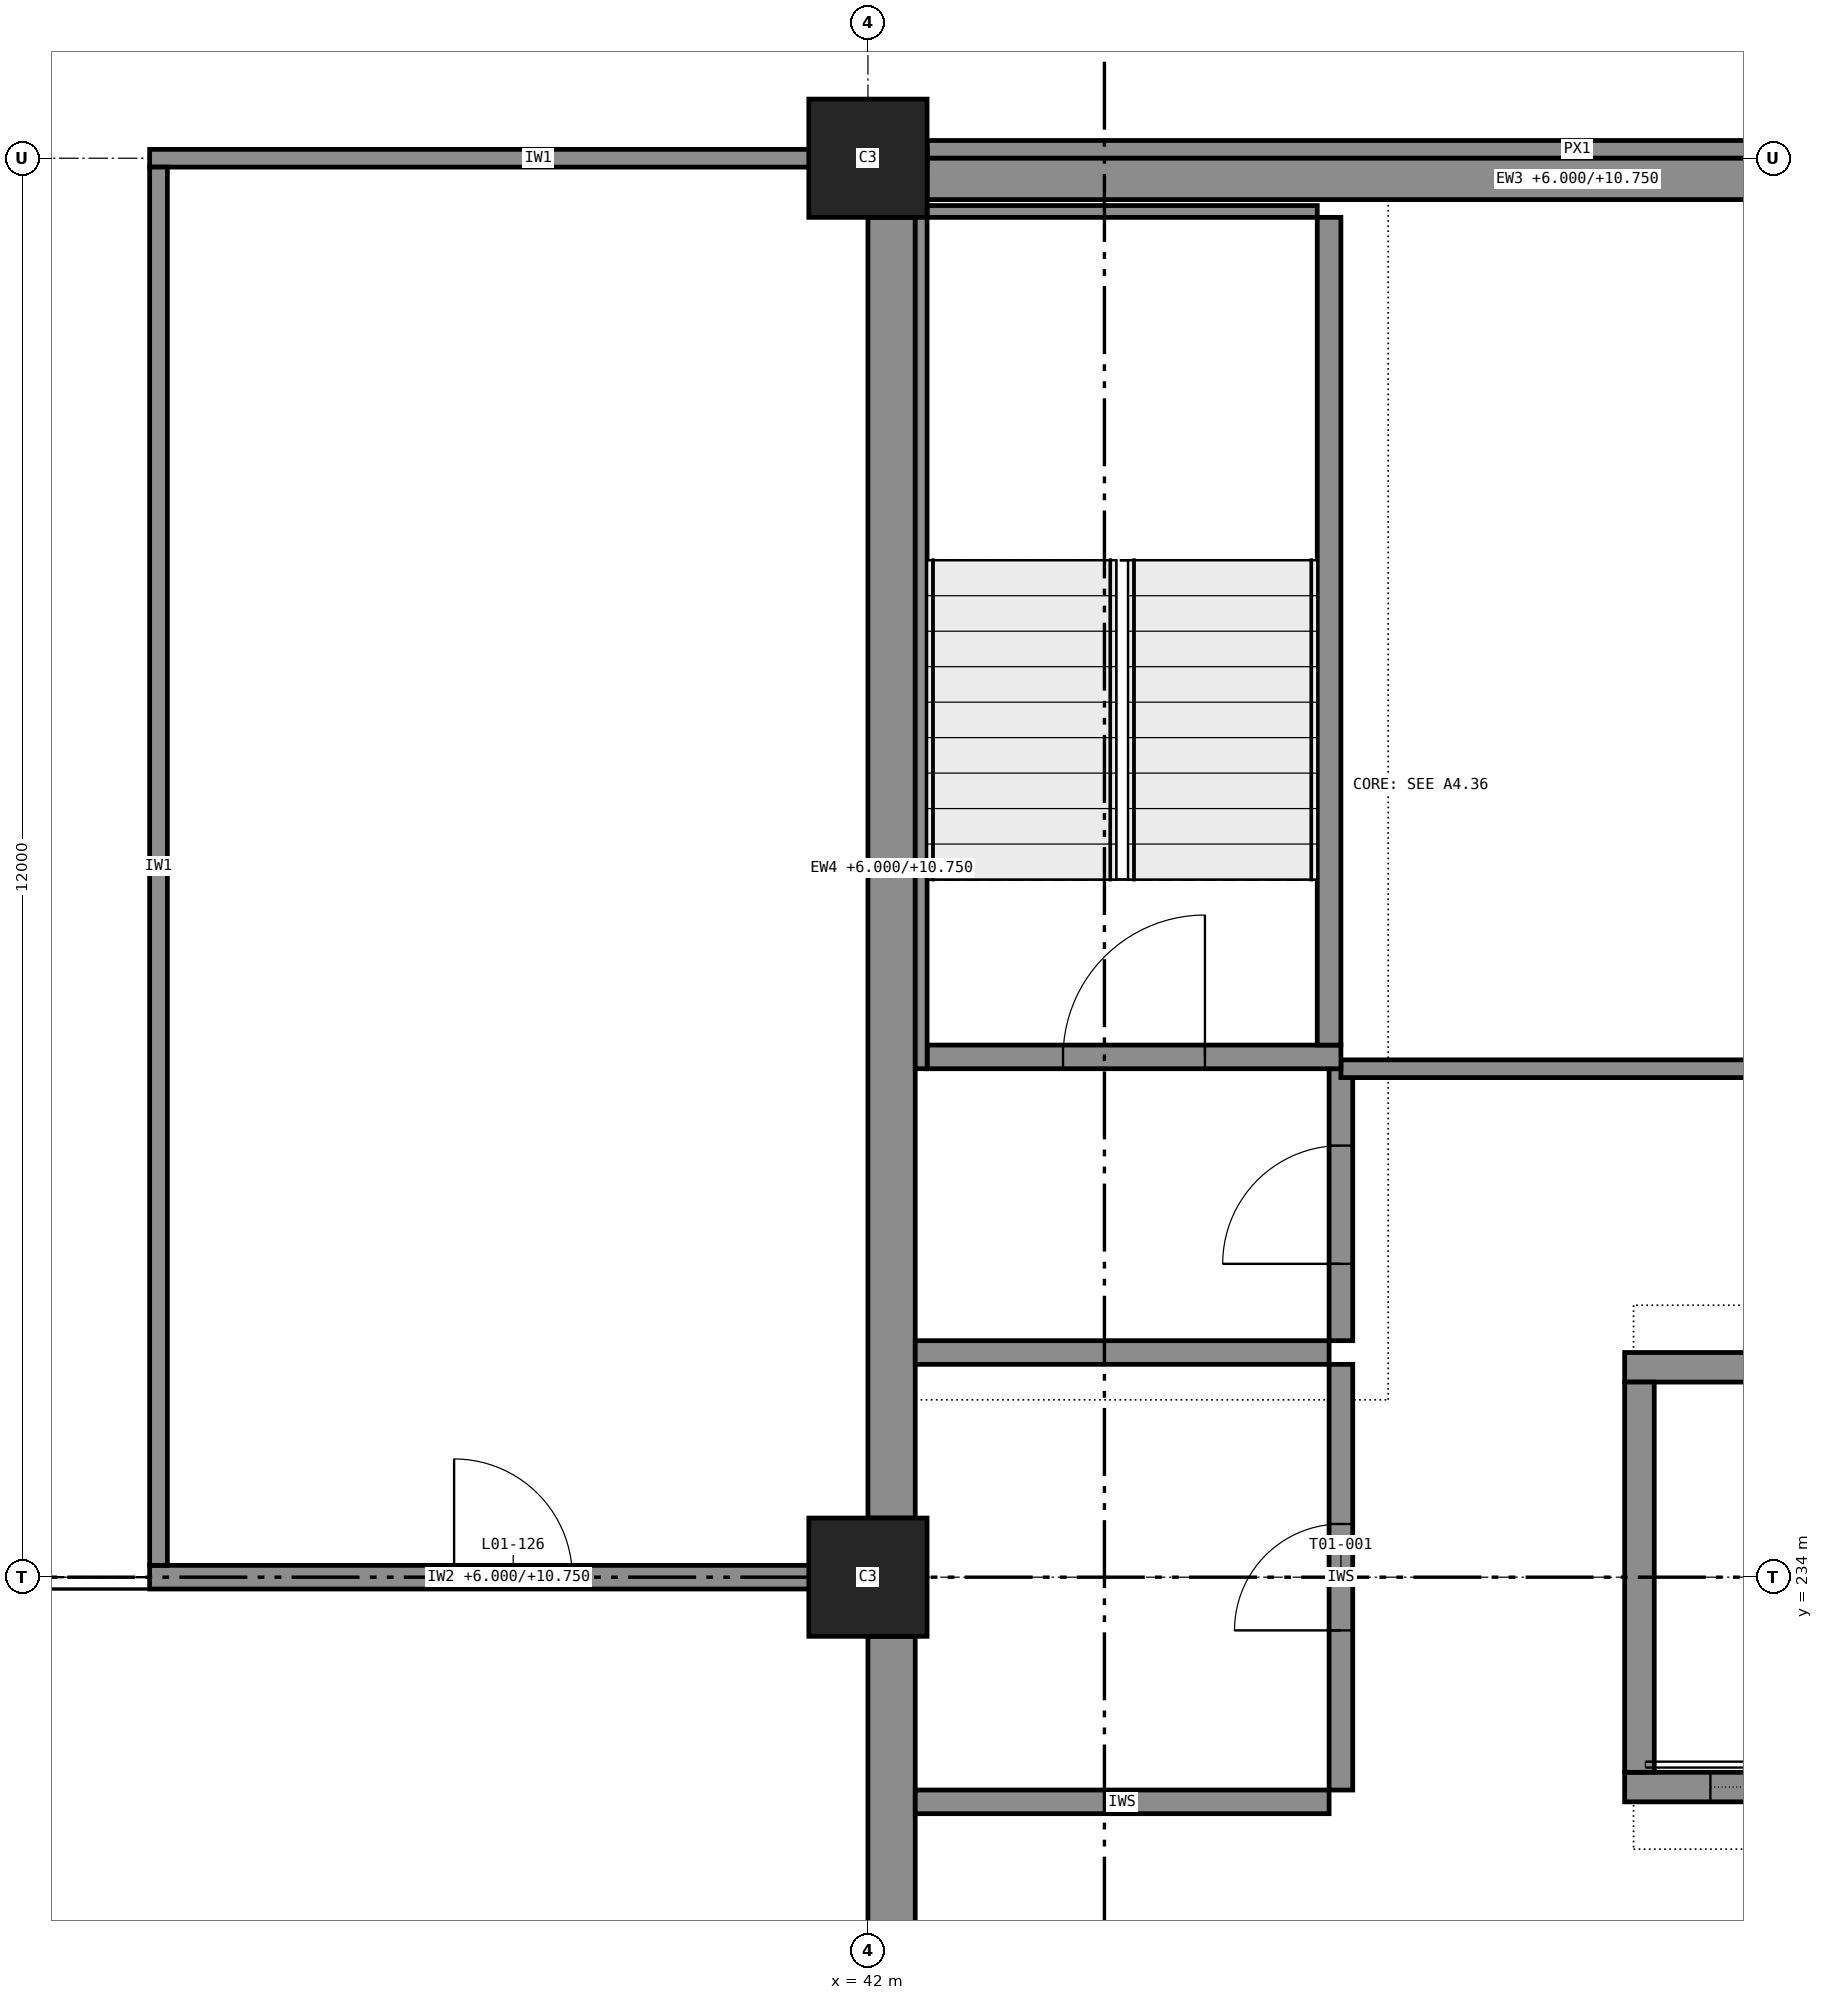
"""IFC4 building model, lengths in metres.
Left out: names, types, materials, properties, quantities, classifications, styles, units other than length and angle.
Written with IfcOpenShell. Run it as: python <this file> out.ifc"""

import sys

from ifc_helpers import new_model, si_unit, direction, frame, frame_2d, origin, origin_2d, place, context, subcontext, project, spatial, rectangle, extrude, element, fill, save


model = new_model("IFC4")
c1 = context("Model", 3, precision=1e-05, world=origin(), true_north=direction((0.0, 1.0)))
c2 = subcontext(c1, "Body", "Model", "MODEL_VIEW")
j1 = project(units=[si_unit("LENGTHUNIT", "METRE"), si_unit("PLANEANGLEUNIT", "RADIAN")], contexts=[c1])
p1 = place(None, origin())
s1 = spatial("IfcSite", under=j1, at=p1, CompositionType="ELEMENT")
p2 = place(p1, origin())
s2 = spatial("IfcBuilding", under=s1, at=p2, CompositionType="ELEMENT")
p3 = place(p2, frame((0.0, 0.0, 6.0)))
s3 = spatial("IfcBuildingStorey", under=s2, at=p3, CompositionType="ELEMENT", Elevation=6.0)
for number, where, z_axis, x_axis in (
    (1, (42.0, 234.0, 0.0), (0.0, 0.0, 1.0), (1.0, 0.0, 0.0)),
    (2, (42.0, 246.0, 0.0), (0.0, 0.0, 1.0), (1.0, 0.0, 0.0)),
):
    element("IfcColumn", number, at=place(p3, frame(where, z_axis=z_axis, x_axis=x_axis)), inside=s3, PredefinedType="COLUMN", context=c2, shape_type="SweptSolid", body=[
        extrude(rectangle(XDim=1.0, YDim=1.0, at=origin_2d()), origin(), (0.0, 0.0, 1.0), 6.0),
    ])
p4 = place(p3, frame((48.4, 232.225, 0.0), z_axis=(0.0, 0.0, 1.0), x_axis=(1.0, 0.0, 0.0)))
e3 = element("IfcWall", 3, at=p4, inside=s3, PredefinedType="SHEAR", context=c2, shape_type="SweptSolid", body=[
    extrude(rectangle(XDim=2.55, YDim=0.25, at=frame_2d((1.275, 0.0))), origin(), (0.0, 0.0, 1.0), 6.0),
])
p5 = place(p4, frame((0.725, 0.0, 0.0)))
e4 = element("IfcOpeningElement", 4, at=p5, cuts=e3, PredefinedType="OPENING", context=c2, shape_type="SweptSolid", body=[
    extrude(rectangle(XDim=1.1, YDim=2.1, at=frame_2d((0.55, 1.05))), frame((0.0, 0.135, 0.0), z_axis=(0.0, -1.0, 0.0), x_axis=(1.0, 0.0, 0.0)), (0.0, 0.0, 1.0), 0.27),
])
p6 = place(p3, frame((48.4, 235.775, 0.0), z_axis=(0.0, 0.0, 1.0), x_axis=(1.0, 0.0, 0.0)))
e5 = element("IfcWall", 5, at=p6, inside=s3, PredefinedType="SHEAR", context=c2, shape_type="SweptSolid", body=[
    extrude(rectangle(XDim=2.55, YDim=0.25, at=frame_2d((1.275, 0.0))), origin(), (0.0, 0.0, 1.0), 6.0),
])
p7 = place(p3, frame((48.525, 232.35, 0.0), z_axis=(0.0, 0.0, 1.0), x_axis=(0.0, 1.0, 0.0)))
e6 = element("IfcWall", 6, at=p7, inside=s3, PredefinedType="SHEAR", context=c2, shape_type="SweptSolid", body=[
    extrude(rectangle(XDim=3.3, YDim=0.25, at=frame_2d((1.65, 0.0))), origin(), (0.0, 0.0, 1.0), 6.0),
])
p8 = place(p3, frame((42.5, 238.4, 0.0), z_axis=(0.0, 0.0, 1.0), x_axis=(1.0, 0.0, 0.0)))
e7 = element("IfcWall", 7, at=p8, inside=s3, PredefinedType="SHEAR", context=c2, shape_type="SweptSolid", body=[
    extrude(rectangle(XDim=3.5, YDim=0.2, at=frame_2d((1.75, 0.0))), origin(), (0.0, 0.0, 1.0), 6.0),
])
p9 = place(p8, frame((1.15, 0.0, 0.0)))
e8 = element("IfcOpeningElement", 8, at=p9, cuts=e7, PredefinedType="OPENING", context=c2, shape_type="SweptSolid", body=[
    extrude(rectangle(XDim=1.2, YDim=2.1, at=frame_2d((0.6, 1.05))), frame((0.0, 0.11, 0.0), z_axis=(0.0, -1.0, 0.0), x_axis=(1.0, 0.0, 0.0)), (0.0, 0.0, 1.0), 0.22),
])
p10 = place(p3, frame((45.9, 238.5, 0.0), z_axis=(0.0, 0.0, 1.0), x_axis=(0.0, 1.0, 0.0)))
e9 = element("IfcWall", 9, at=p10, inside=s3, PredefinedType="SHEAR", context=c2, shape_type="SweptSolid", body=[
    extrude(rectangle(XDim=7.0, YDim=0.2, at=frame_2d((3.5, 0.0))), origin(), (0.0, 0.0, 1.0), 6.0),
])
p11 = place(p3, frame((42.45, 238.3, 0.0), z_axis=(0.0, 0.0, 1.0), x_axis=(0.0, 1.0, 0.0)))
e10 = element("IfcWall", 10, at=p11, inside=s3, PredefinedType="SHEAR", context=c2, shape_type="SweptSolid", body=[
    extrude(rectangle(XDim=7.3, YDim=0.1, at=frame_2d((3.65, 0.0))), origin(), (0.0, 0.0, 1.0), 5.75),
])
p12 = place(p3, frame((42.5, 245.55, 0.0), z_axis=(0.0, 0.0, 1.0), x_axis=(1.0, 0.0, 0.0)))
e11 = element("IfcWall", 11, at=p12, inside=s3, PredefinedType="SHEAR", context=c2, shape_type="SweptSolid", body=[
    extrude(rectangle(XDim=3.3, YDim=0.1, at=frame_2d((1.65, 0.0))), origin(), (0.0, 0.0, 1.0), 5.75),
])
p13 = place(p3, frame((53.5, 245.825, 0.0), z_axis=(0.0, 0.0, 1.0), x_axis=(-1.0, 0.0, 0.0)))
e12 = element("IfcWall", 12, at=p13, inside=s3, PredefinedType="STANDARD", context=c2, shape_type="SweptSolid", body=[
    extrude(rectangle(XDim=11.0, YDim=0.35, at=frame_2d((5.5, 0.0))), origin(), (0.0, 0.0, 1.0), 4.75),
])
p14 = place(p3, frame((53.5, 246.075, 5.75), z_axis=(0.0, 0.0, 1.0), x_axis=(-1.0, 0.0, 0.0)))
e13 = element("IfcWall", 13, at=p14, inside=s3, PredefinedType="STANDARD", context=c2, shape_type="SweptSolid", body=[
    extrude(rectangle(XDim=11.0, YDim=0.15, at=frame_2d((5.5, 0.0))), origin(), (0.0, 0.0, 1.0), 0.25),
])
for number, where, z_axis, x_axis in (
    (14, (42.2, 245.5, 0.0), (0.0, 0.0, 1.0), (0.0, -1.0, 0.0)),
    (15, (42.2, 233.5, 0.0), (0.0, 0.0, 1.0), (0.0, -1.0, 0.0)),
):
    element("IfcWall", number, at=place(p3, frame(where, z_axis=z_axis, x_axis=x_axis)), inside=s3, PredefinedType="SOLIDWALL", context=c2, shape_type="SweptSolid", body=[
        extrude(rectangle(XDim=11.0, YDim=0.4, at=frame_2d((5.5, 0.0))), origin(), (0.0, 0.0, 1.0), 4.75),
    ])
p15 = place(p3, frame((35.925, 234.0, 0.0), z_axis=(0.0, 0.0, 1.0), x_axis=(1.0, 0.0, 0.0)))
e16 = element("IfcWall", 16, at=p15, inside=s3, PredefinedType="PARTITIONING", context=c2, shape_type="SweptSolid", body=[
    extrude(rectangle(XDim=6.075, YDim=0.2, at=frame_2d((3.038, 0.0))), origin(), (0.0, 0.0, 1.0), 4.75),
])
p16 = place(p15, frame((2.575, 0.0, 0.0)))
e17 = element("IfcOpeningElement", 17, at=p16, cuts=e16, PredefinedType="OPENING", context=c2, shape_type="SweptSolid", body=[
    extrude(rectangle(XDim=1.0, YDim=2.1, at=frame_2d((0.5, 1.05))), frame((0.0, 0.11, 0.0), z_axis=(0.0, -1.0, 0.0), x_axis=(1.0, 0.0, 0.0)), (0.0, 0.0, 1.0), 0.22),
])
p17 = place(p3, frame((35.925, 246.0, 0.0), z_axis=(0.0, 0.0, 1.0), x_axis=(1.0, 0.0, 0.0)))
e18 = element("IfcWall", 18, at=p17, inside=s3, PredefinedType="PARTITIONING", context=c2, shape_type="SweptSolid", body=[
    extrude(rectangle(XDim=6.575, YDim=0.15, at=frame_2d((3.288, 0.0))), origin(), (0.0, 0.0, 1.0), 5.75),
])
p18 = place(p3, frame((36.0, 234.1, 0.0), z_axis=(0.0, 0.0, 1.0), x_axis=(0.0, 1.0, 0.0)))
e19 = element("IfcWall", 19, at=p18, inside=s3, PredefinedType="PARTITIONING", context=c2, shape_type="SweptSolid", body=[
    extrude(rectangle(XDim=11.825, YDim=0.15, at=frame_2d((5.913, 0.0))), origin(), (0.0, 0.0, 1.0), 5.75),
])
for number, where, z_axis, x_axis in (
    (20, (42.4, 232.1, 0.0), (0.0, 0.0, 1.0), (1.0, 0.0, 0.0)),
    (21, (42.4, 235.9, 0.0), (0.0, 0.0, 1.0), (1.0, 0.0, 0.0)),
):
    element("IfcWall", number, at=place(p3, frame(where, z_axis=z_axis, x_axis=x_axis)), inside=s3, PredefinedType="PARTITIONING", context=c2, shape_type="SweptSolid", body=[
        extrude(rectangle(XDim=3.5, YDim=0.2, at=frame_2d((1.75, 0.0))), origin(), (0.0, 0.0, 1.0), 5.75),
    ])
p19 = place(p3, frame((46.0, 232.2, 0.0), z_axis=(0.0, 0.0, 1.0), x_axis=(0.0, 1.0, 0.0)))
e22 = element("IfcWall", 22, at=p19, inside=s3, PredefinedType="PARTITIONING", context=c2, shape_type="SweptSolid", body=[
    extrude(rectangle(XDim=3.6, YDim=0.2, at=frame_2d((1.8, 0.0))), origin(), (0.0, 0.0, 1.0), 5.75),
])
p20 = place(p19, frame((1.35, 0.0, 0.0)))
e23 = element("IfcOpeningElement", 23, at=p20, cuts=e22, PredefinedType="OPENING", context=c2, shape_type="SweptSolid", body=[
    extrude(rectangle(XDim=0.9, YDim=2.1, at=frame_2d((0.45, 1.05))), frame((0.0, 0.11, 0.0), z_axis=(0.0, -1.0, 0.0), x_axis=(1.0, 0.0, 0.0)), (0.0, 0.0, 1.0), 0.22),
])
p21 = place(p3, frame((46.0, 236.0, 0.0), z_axis=(0.0, 0.0, 1.0), x_axis=(0.0, 1.0, 0.0)))
e24 = element("IfcWall", 24, at=p21, inside=s3, PredefinedType="PARTITIONING", context=c2, shape_type="SweptSolid", body=[
    extrude(rectangle(XDim=2.3, YDim=0.2, at=frame_2d((1.15, 0.0))), origin(), (0.0, 0.0, 1.0), 5.75),
])
p22 = place(p21, frame((0.65, 0.0, 0.0)))
e25 = element("IfcOpeningElement", 25, at=p22, cuts=e24, PredefinedType="OPENING", context=c2, shape_type="SweptSolid", body=[
    extrude(rectangle(XDim=1.0, YDim=2.1, at=frame_2d((0.5, 1.05))), frame((0.0, 0.11, 0.0), z_axis=(0.0, -1.0, 0.0), x_axis=(1.0, 0.0, 0.0)), (0.0, 0.0, 1.0), 0.22),
])
p23 = place(p3, frame((46.0, 238.3, 0.0), z_axis=(0.0, 0.0, 1.0), x_axis=(1.0, 0.0, 0.0)))
e26 = element("IfcWall", 26, at=p23, inside=s3, PredefinedType="PARTITIONING", context=c2, shape_type="SweptSolid", body=[
    extrude(rectangle(XDim=16.1, YDim=0.15, at=frame_2d((8.05, 0.0))), origin(), (0.0, 0.0, 1.0), 5.75),
])
p24 = place(p23, frame((4.5, 0.0, 0.0)))
e27 = element("IfcOpeningElement", 27, at=p24, cuts=e26, PredefinedType="OPENING", context=c2, shape_type="SweptSolid", body=[
    extrude(rectangle(XDim=1.0, YDim=2.1, at=frame_2d((0.5, 1.05))), frame((0.0, 0.085, 0.0), z_axis=(0.0, -1.0, 0.0), x_axis=(1.0, 0.0, 0.0)), (0.0, 0.0, 1.0), 0.17),
])
p25 = place(p23, frame((11.5, 0.0, 0.0)))
e28 = element("IfcOpeningElement", 28, at=p25, cuts=e26, PredefinedType="OPENING", context=c2, shape_type="SweptSolid", body=[
    extrude(rectangle(XDim=1.0, YDim=2.1, at=frame_2d((0.5, 1.05))), frame((0.0, 0.085, 0.0), z_axis=(0.0, -1.0, 0.0), x_axis=(1.0, 0.0, 0.0)), (0.0, 0.0, 1.0), 0.17),
])
p26 = place(p16, origin())
e29 = element("IfcDoor", 29, at=p26, inside=s3, OperationType="SINGLE_SWING_RIGHT", PredefinedType="DOOR", context=c2, shape_type="SweptSolid", body=[
    extrude(rectangle(XDim=1.0, YDim=2.1, at=frame_2d((0.5, 1.05))), frame((0.0, 0.025, 0.0), z_axis=(0.0, -1.0, 0.0), x_axis=(1.0, 0.0, 0.0)), (0.0, 0.0, 1.0), 0.05),
])
fill(e17, e29)
p27 = place(p20, origin())
e30 = element("IfcDoor", 30, at=p27, inside=s3, OperationType="SINGLE_SWING_LEFT", PredefinedType="DOOR", context=c2, shape_type="SweptSolid", body=[
    extrude(rectangle(XDim=0.9, YDim=2.1, at=frame_2d((0.45, 1.05))), frame((0.0, 0.025, 0.0), z_axis=(0.0, -1.0, 0.0), x_axis=(1.0, 0.0, 0.0)), (0.0, 0.0, 1.0), 0.05),
])
fill(e23, e30)
p28 = place(p22, origin())
e31 = element("IfcDoor", 31, at=p28, inside=s3, OperationType="SINGLE_SWING_LEFT", PredefinedType="DOOR", context=c2, shape_type="SweptSolid", body=[
    extrude(rectangle(XDim=1.0, YDim=2.1, at=frame_2d((0.5, 1.05))), frame((0.0, 0.025, 0.0), z_axis=(0.0, -1.0, 0.0), x_axis=(1.0, 0.0, 0.0)), (0.0, 0.0, 1.0), 0.05),
])
fill(e25, e31)
p29 = place(p5, origin())
e32 = element("IfcDoor", 32, at=p29, inside=s3, OperationType="SLIDING_TO_LEFT", PredefinedType="DOOR", context=c2, shape_type="SweptSolid", body=[
    extrude(rectangle(XDim=1.1, YDim=2.1, at=frame_2d((0.55, 1.05))), frame((0.0, 0.025, 0.0), z_axis=(0.0, -1.0, 0.0), x_axis=(1.0, 0.0, 0.0)), (0.0, 0.0, 1.0), 0.05),
])
fill(e4, e32)
p30 = place(p9, origin())
e33 = element("IfcDoor", 33, at=p30, inside=s3, OperationType="SINGLE_SWING_RIGHT", PredefinedType="DOOR", context=c2, shape_type="SweptSolid", body=[
    extrude(rectangle(XDim=1.2, YDim=2.1, at=frame_2d((0.6, 1.05))), frame((0.0, 0.025, 0.0), z_axis=(0.0, -1.0, 0.0), x_axis=(1.0, 0.0, 0.0)), (0.0, 0.0, 1.0), 0.05),
])
fill(e8, e33)
save(model, sys.argv[1])
